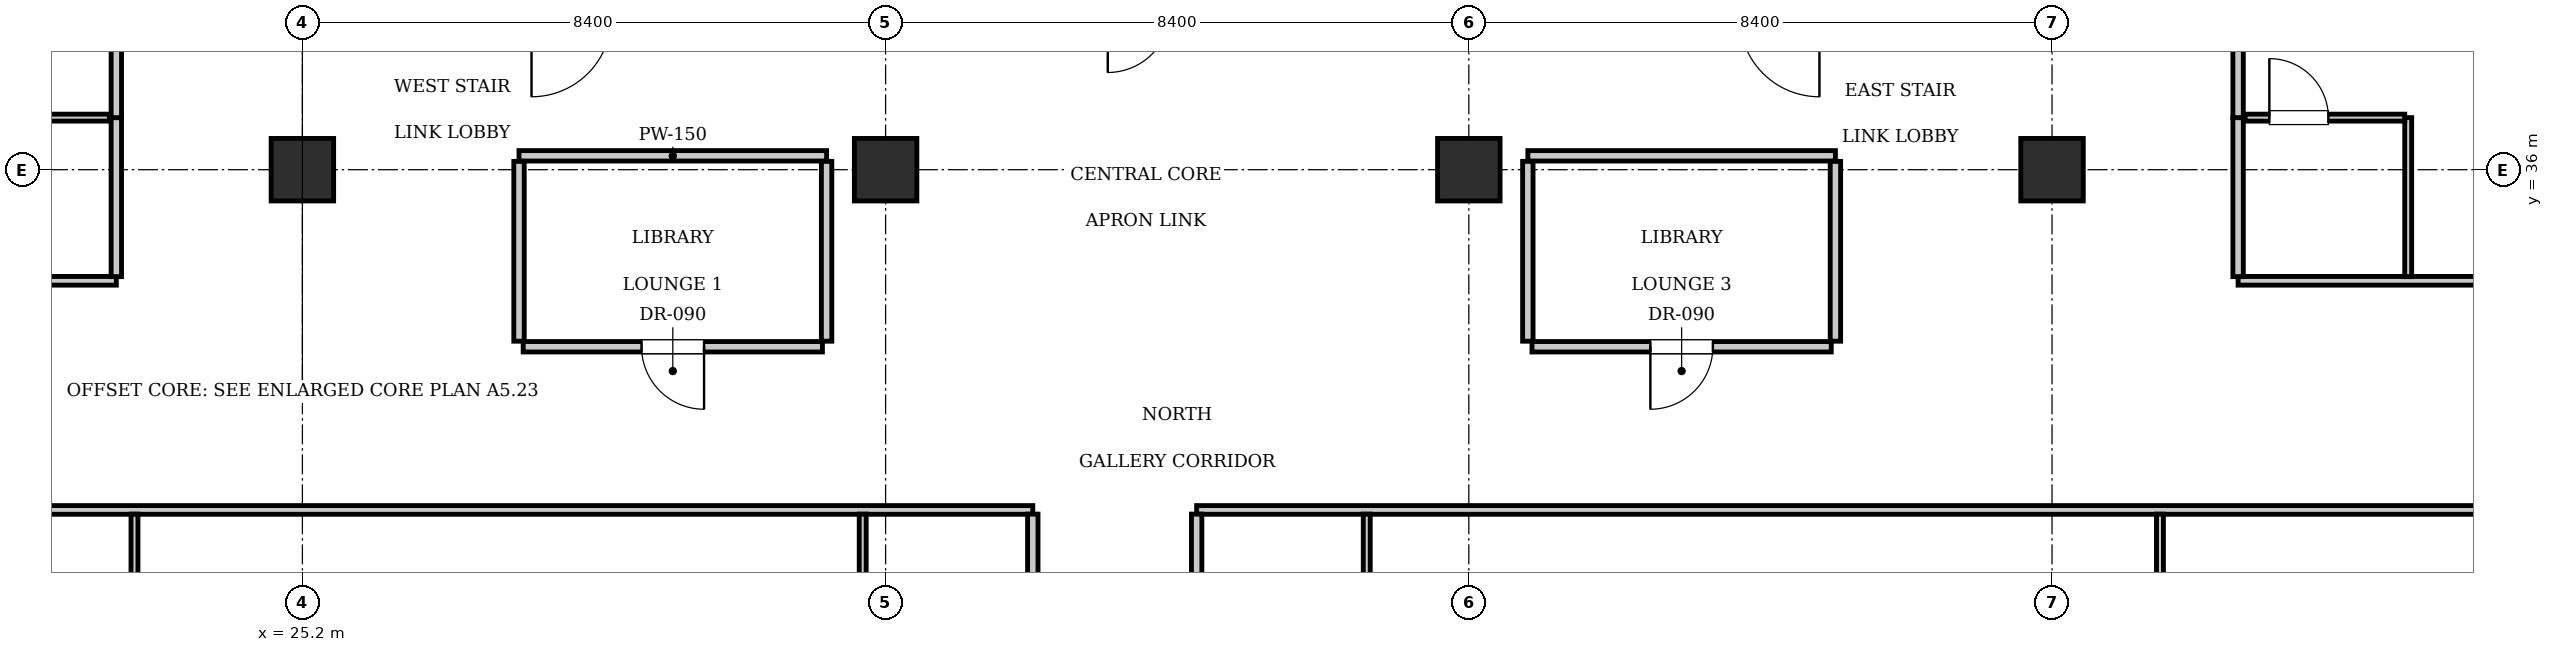
"""IFC4 building model, lengths in metres.
Left out: names, types, materials, properties, quantities, classifications, styles, units other than length and angle.
Written with IfcOpenShell. Run it as: python <this file> out.ifc"""

import sys

from ifc_helpers import new_model, si_unit, direction, frame, frame_2d, origin, origin_2d, place, context, subcontext, project, spatial, rectangle, extrude, element, fill, save


model = new_model("IFC4")
c1 = context("Model", 3, precision=1e-05, world=origin(), true_north=direction((0.0, 1.0)))
c2 = subcontext(c1, "Body", "Model", "MODEL_VIEW")
j1 = project(units=[si_unit("LENGTHUNIT", "METRE"), si_unit("PLANEANGLEUNIT", "RADIAN")], contexts=[c1])
p1 = place(None, origin())
s1 = spatial("IfcSite", under=j1, at=p1, CompositionType="ELEMENT")
p2 = place(p1, origin())
s2 = spatial("IfcBuilding", under=s1, at=p2, CompositionType="ELEMENT")
p3 = place(p2, frame((0.0, 0.0, 185.15)))
s3 = spatial("IfcBuildingStorey", under=s2, at=p3, CompositionType="ELEMENT", Elevation=185.15)
for number, where, z_axis, x_axis in (
    (1, (25.2, 36.0, 0.0), (0.0, 0.0, 1.0), (1.0, 0.0, 0.0)),
    (2, (33.6, 36.0, 0.0), (0.0, 0.0, 1.0), (1.0, 0.0, 0.0)),
    (3, (42.0, 36.0, 0.0), (0.0, 0.0, 1.0), (1.0, 0.0, 0.0)),
    (4, (50.4, 36.0, 0.0), (0.0, 0.0, 1.0), (1.0, 0.0, 0.0)),
):
    element("IfcColumn", number, at=place(p3, frame(where, z_axis=z_axis, x_axis=x_axis)), inside=s3, PredefinedType="COLUMN", context=c2, shape_type="SweptSolid", body=[
        extrude(rectangle(XDim=0.9, YDim=0.9, at=origin_2d()), origin(), (0.0, 0.0, 1.0), 3.85),
    ])
p4 = place(p3, frame((28.32, 36.2, 0.0), z_axis=(0.0, 0.0, 1.0), x_axis=(1.0, 0.0, 0.0)))
e5 = element("IfcWall", 5, at=p4, inside=s3, PredefinedType="PARTITIONING", context=c2, shape_type="SweptSolid", body=[
    extrude(rectangle(XDim=4.43, YDim=0.15, at=frame_2d((2.215, 0.0))), origin(), (0.0, 0.0, 1.0), 3.61),
])
for number, where, z_axis, x_axis in (
    (6, (28.32, 33.53, 0.0), (0.0, 0.0, 1.0), (0.0, 1.0, 0.0)),
    (7, (32.75, 33.53, 0.0), (0.0, 0.0, 1.0), (0.0, 1.0, 0.0)),
):
    element("IfcWall", number, at=place(p3, frame(where, z_axis=z_axis, x_axis=x_axis)), inside=s3, PredefinedType="PARTITIONING", context=c2, shape_type="SweptSolid", body=[
        extrude(rectangle(XDim=2.59, YDim=0.15, at=frame_2d((1.295, 0.0))), origin(), (0.0, 0.0, 1.0), 3.61),
    ])
p5 = place(p3, frame((28.38, 33.45, 0.0), z_axis=(0.0, 0.0, 1.0), x_axis=(1.0, 0.0, 0.0)))
e8 = element("IfcWall", 8, at=p5, inside=s3, PredefinedType="PARTITIONING", context=c2, shape_type="SweptSolid", body=[
    extrude(rectangle(XDim=4.31, YDim=0.15, at=frame_2d((2.155, 0.0))), origin(), (0.0, 0.0, 1.0), 3.61),
])
p6 = place(p5, frame((1.705, 0.0, 0.0)))
e9 = element("IfcOpeningElement", 9, at=p6, cuts=e8, PredefinedType="OPENING", context=c2, shape_type="SweptSolid", body=[
    extrude(rectangle(XDim=0.9, YDim=2.1, at=frame_2d((0.45, 1.05))), frame((0.0, 0.085, 0.0), z_axis=(0.0, -1.0, 0.0), x_axis=(1.0, 0.0, 0.0)), (0.0, 0.0, 1.0), 0.17),
])
p7 = place(p3, frame((42.85, 36.2, 0.0), z_axis=(0.0, 0.0, 1.0), x_axis=(1.0, 0.0, 0.0)))
e10 = element("IfcWall", 10, at=p7, inside=s3, PredefinedType="PARTITIONING", context=c2, shape_type="SweptSolid", body=[
    extrude(rectangle(XDim=4.43, YDim=0.15, at=frame_2d((2.215, 0.0))), origin(), (0.0, 0.0, 1.0), 3.61),
])
for number, where, z_axis, x_axis in (
    (11, (42.85, 33.53, 0.0), (0.0, 0.0, 1.0), (0.0, 1.0, 0.0)),
    (12, (47.28, 33.53, 0.0), (0.0, 0.0, 1.0), (0.0, 1.0, 0.0)),
):
    element("IfcWall", number, at=place(p3, frame(where, z_axis=z_axis, x_axis=x_axis)), inside=s3, PredefinedType="PARTITIONING", context=c2, shape_type="SweptSolid", body=[
        extrude(rectangle(XDim=2.59, YDim=0.15, at=frame_2d((1.295, 0.0))), origin(), (0.0, 0.0, 1.0), 3.61),
    ])
p8 = place(p3, frame((42.91, 33.45, 0.0), z_axis=(0.0, 0.0, 1.0), x_axis=(1.0, 0.0, 0.0)))
e13 = element("IfcWall", 13, at=p8, inside=s3, PredefinedType="PARTITIONING", context=c2, shape_type="SweptSolid", body=[
    extrude(rectangle(XDim=4.31, YDim=0.15, at=frame_2d((2.155, 0.0))), origin(), (0.0, 0.0, 1.0), 3.61),
])
p9 = place(p8, frame((1.705, 0.0, 0.0)))
e14 = element("IfcOpeningElement", 14, at=p9, cuts=e13, PredefinedType="OPENING", context=c2, shape_type="SweptSolid", body=[
    extrude(rectangle(XDim=0.9, YDim=2.1, at=frame_2d((0.45, 1.05))), frame((0.0, 0.085, 0.0), z_axis=(0.0, -1.0, 0.0), x_axis=(1.0, 0.0, 0.0)), (0.0, 0.0, 1.0), 0.17),
])
p10 = place(p3, frame((13.2, 31.1, 0.0), z_axis=(0.0, 0.0, 1.0), x_axis=(1.0, 0.0, 0.0)))
e15 = element("IfcWall", 15, at=p10, inside=s3, PredefinedType="PARTITIONING", context=c2, shape_type="SweptSolid", body=[
    extrude(rectangle(XDim=22.52, YDim=0.125, at=frame_2d((11.26, 0.0))), origin(), (0.0, 0.0, 1.0), 3.61),
])
p11 = place(p3, frame((38.08, 31.1, 0.0), z_axis=(0.0, 0.0, 1.0), x_axis=(1.0, 0.0, 0.0)))
e16 = element("IfcWall", 16, at=p11, inside=s3, PredefinedType="PARTITIONING", context=c2, shape_type="SweptSolid", body=[
    extrude(rectangle(XDim=24.32, YDim=0.125, at=frame_2d((12.16, 0.0))), origin(), (0.0, 0.0, 1.0), 3.61),
])
p12 = place(p3, frame((35.72, 29.15, 0.0), z_axis=(0.0, 0.0, 1.0), x_axis=(0.0, 1.0, 0.0)))
e17 = element("IfcWall", 17, at=p12, inside=s3, PredefinedType="PARTITIONING", context=c2, shape_type="SweptSolid", body=[
    extrude(rectangle(XDim=1.89, YDim=0.15, at=frame_2d((0.945, 0.0))), origin(), (0.0, 0.0, 1.0), 3.61),
])
p13 = place(p3, frame((33.27, 29.15, 0.0), z_axis=(0.0, 0.0, 1.0), x_axis=(0.0, 1.0, 0.0)))
e18 = element("IfcWall", 18, at=p13, inside=s3, PredefinedType="PARTITIONING", context=c2, shape_type="SweptSolid", body=[
    extrude(rectangle(XDim=1.89, YDim=0.1, at=frame_2d((0.945, 0.0))), origin(), (0.0, 0.0, 1.0), 3.61),
])
p14 = place(p3, frame((22.781, 27.46, 0.0), z_axis=(0.0, 0.0, 1.0), x_axis=(0.0, 1.0, 0.0)))
e19 = element("IfcWall", 19, at=p14, inside=s3, PredefinedType="PARTITIONING", context=c2, shape_type="SweptSolid", body=[
    extrude(rectangle(XDim=3.58, YDim=0.1, at=frame_2d((1.79, 0.0))), origin(), (0.0, 0.0, 1.0), 3.61),
])
p15 = place(p14, frame((1.34, 0.0, 0.0)))
e20 = element("IfcOpeningElement", 20, at=p15, cuts=e19, PredefinedType="OPENING", context=c2, shape_type="SweptSolid", body=[
    extrude(rectangle(XDim=0.9, YDim=2.1, at=frame_2d((0.45, 1.05))), frame((0.0, 0.06, 0.0), z_axis=(0.0, -1.0, 0.0), x_axis=(1.0, 0.0, 0.0)), (0.0, 0.0, 1.0), 0.12),
])
p16 = place(p3, frame((38.08, 29.15, 0.0), z_axis=(0.0, 0.0, 1.0), x_axis=(0.0, 1.0, 0.0)))
e21 = element("IfcWall", 21, at=p16, inside=s3, PredefinedType="PARTITIONING", context=c2, shape_type="SweptSolid", body=[
    extrude(rectangle(XDim=1.89, YDim=0.15, at=frame_2d((0.945, 0.0))), origin(), (0.0, 0.0, 1.0), 3.61),
])
p17 = place(p3, frame((40.53, 29.15, 0.0), z_axis=(0.0, 0.0, 1.0), x_axis=(0.0, 1.0, 0.0)))
e22 = element("IfcWall", 22, at=p17, inside=s3, PredefinedType="PARTITIONING", context=c2, shape_type="SweptSolid", body=[
    extrude(rectangle(XDim=1.89, YDim=0.1, at=frame_2d((0.945, 0.0))), origin(), (0.0, 0.0, 1.0), 3.61),
])
p18 = place(p3, frame((51.954, 27.46, 0.0), z_axis=(0.0, 0.0, 1.0), x_axis=(0.0, 1.0, 0.0)))
e23 = element("IfcWall", 23, at=p18, inside=s3, PredefinedType="PARTITIONING", context=c2, shape_type="SweptSolid", body=[
    extrude(rectangle(XDim=3.58, YDim=0.1, at=frame_2d((1.79, 0.0))), origin(), (0.0, 0.0, 1.0), 3.61),
])
p19 = place(p18, frame((1.34, 0.0, 0.0)))
e24 = element("IfcOpeningElement", 24, at=p19, cuts=e23, PredefinedType="OPENING", context=c2, shape_type="SweptSolid", body=[
    extrude(rectangle(XDim=0.9, YDim=2.1, at=frame_2d((0.45, 1.05))), frame((0.0, 0.06, 0.0), z_axis=(0.0, -1.0, 0.0), x_axis=(1.0, 0.0, 0.0)), (0.0, 0.0, 1.0), 0.12),
])
p20 = place(p3, frame((13.2, 34.4, 0.0), z_axis=(0.0, 0.0, 1.0), x_axis=(1.0, 0.0, 0.0)))
e25 = element("IfcWall", 25, at=p20, inside=s3, PredefinedType="PARTITIONING", context=c2, shape_type="SweptSolid", body=[
    extrude(rectangle(XDim=9.32, YDim=0.125, at=frame_2d((4.66, 0.0))), origin(), (0.0, 0.0, 1.0), 3.61),
])
p21 = place(p3, frame((53.08, 34.4, 0.0), z_axis=(0.0, 0.0, 1.0), x_axis=(1.0, 0.0, 0.0)))
e26 = element("IfcWall", 26, at=p21, inside=s3, PredefinedType="PARTITIONING", context=c2, shape_type="SweptSolid", body=[
    extrude(rectangle(XDim=9.32, YDim=0.125, at=frame_2d((4.66, 0.0))), origin(), (0.0, 0.0, 1.0), 3.61),
])
p22 = place(p3, frame((22.52, 34.46, 0.0), z_axis=(0.0, 0.0, 1.0), x_axis=(0.0, 1.0, 0.0)))
e27 = element("IfcWall", 27, at=p22, inside=s3, PredefinedType="PARTITIONING", context=c2, shape_type="SweptSolid", body=[
    extrude(rectangle(XDim=2.29, YDim=0.15, at=frame_2d((1.145, 0.0))), origin(), (0.0, 0.0, 1.0), 3.61),
])
p23 = place(p3, frame((22.52, 36.75, 0.0), z_axis=(0.0, 0.0, 1.0), x_axis=(0.0, 1.0, 0.0)))
e28 = element("IfcWall", 28, at=p23, inside=s3, PredefinedType="PARTITIONING", context=c2, shape_type="SweptSolid", body=[
    extrude(rectangle(XDim=5.159, YDim=0.15, at=frame_2d((2.579, 0.0))), origin(), (0.0, 0.0, 1.0), 3.61),
])
p24 = place(p23, frame((2.104, 0.0, 0.0)))
e29 = element("IfcOpeningElement", 29, at=p24, cuts=e28, PredefinedType="OPENING", context=c2, shape_type="SweptSolid", body=[
    extrude(rectangle(XDim=0.95, YDim=2.15, at=frame_2d((0.475, 1.075))), frame((0.0, 0.085, 0.0), z_axis=(0.0, -1.0, 0.0), x_axis=(1.0, 0.0, 0.0)), (0.0, 0.0, 1.0), 0.17),
])
p25 = place(p3, frame((20.12, 36.75, 0.0), z_axis=(0.0, 0.0, 1.0), x_axis=(1.0, 0.0, 0.0)))
e30 = element("IfcWall", 30, at=p25, inside=s3, PredefinedType="PARTITIONING", context=c2, shape_type="SweptSolid", body=[
    extrude(rectangle(XDim=2.3, YDim=0.1, at=frame_2d((1.15, 0.0))), origin(), (0.0, 0.0, 1.0), 3.61),
])
p26 = place(p25, frame((0.35, 0.0, 0.0)))
e31 = element("IfcOpeningElement", 31, at=p26, cuts=e30, PredefinedType="OPENING", context=c2, shape_type="SweptSolid", body=[
    extrude(rectangle(XDim=0.85, YDim=2.1, at=frame_2d((0.425, 1.05))), frame((0.0, 0.06, 0.0), z_axis=(0.0, -1.0, 0.0), x_axis=(1.0, 0.0, 0.0)), (0.0, 0.0, 1.0), 0.12),
])
p27 = place(p3, frame((53.08, 34.46, 0.0), z_axis=(0.0, 0.0, 1.0), x_axis=(0.0, 1.0, 0.0)))
e32 = element("IfcWall", 32, at=p27, inside=s3, PredefinedType="PARTITIONING", context=c2, shape_type="SweptSolid", body=[
    extrude(rectangle(XDim=2.29, YDim=0.15, at=frame_2d((1.145, 0.0))), origin(), (0.0, 0.0, 1.0), 3.61),
])
p28 = place(p3, frame((53.08, 36.75, 0.0), z_axis=(0.0, 0.0, 1.0), x_axis=(0.0, 1.0, 0.0)))
e33 = element("IfcWall", 33, at=p28, inside=s3, PredefinedType="PARTITIONING", context=c2, shape_type="SweptSolid", body=[
    extrude(rectangle(XDim=5.159, YDim=0.15, at=frame_2d((2.579, 0.0))), origin(), (0.0, 0.0, 1.0), 3.61),
])
p29 = place(p28, frame((2.104, 0.0, 0.0)))
e34 = element("IfcOpeningElement", 34, at=p29, cuts=e33, PredefinedType="OPENING", context=c2, shape_type="SweptSolid", body=[
    extrude(rectangle(XDim=0.95, YDim=2.15, at=frame_2d((0.475, 1.075))), frame((0.0, 0.085, 0.0), z_axis=(0.0, -1.0, 0.0), x_axis=(1.0, 0.0, 0.0)), (0.0, 0.0, 1.0), 0.17),
])
p30 = place(p3, frame((55.53, 34.46, 0.0), z_axis=(0.0, 0.0, 1.0), x_axis=(0.0, 1.0, 0.0)))
e35 = element("IfcWall", 35, at=p30, inside=s3, PredefinedType="PARTITIONING", context=c2, shape_type="SweptSolid", body=[
    extrude(rectangle(XDim=2.29, YDim=0.1, at=frame_2d((1.145, 0.0))), origin(), (0.0, 0.0, 1.0), 3.61),
])
p31 = place(p3, frame((53.18, 36.75, 0.0), z_axis=(0.0, 0.0, 1.0), x_axis=(1.0, 0.0, 0.0)))
e36 = element("IfcWall", 36, at=p31, inside=s3, PredefinedType="PARTITIONING", context=c2, shape_type="SweptSolid", body=[
    extrude(rectangle(XDim=2.3, YDim=0.1, at=frame_2d((1.15, 0.0))), origin(), (0.0, 0.0, 1.0), 3.61),
])
p32 = place(p31, frame((0.35, 0.0, 0.0)))
e37 = element("IfcOpeningElement", 37, at=p32, cuts=e36, PredefinedType="OPENING", context=c2, shape_type="SweptSolid", body=[
    extrude(rectangle(XDim=0.85, YDim=2.1, at=frame_2d((0.425, 1.05))), frame((0.0, 0.06, 0.0), z_axis=(0.0, -1.0, 0.0), x_axis=(1.0, 0.0, 0.0)), (0.0, 0.0, 1.0), 0.12),
])
p33 = place(p6, frame((0.9, 0.0, 0.0), z_axis=(0.0, 0.0, 1.0), x_axis=(-1.0, 0.0, 0.0)))
e38 = element("IfcDoor", 38, at=p33, inside=s3, OperationType="SINGLE_SWING_LEFT", PredefinedType="DOOR", context=c2, shape_type="SweptSolid", body=[
    extrude(rectangle(XDim=0.9, YDim=2.1, at=frame_2d((0.45, 1.05))), frame((0.0, 0.025, 0.0), z_axis=(0.0, -1.0, 0.0), x_axis=(1.0, 0.0, 0.0)), (0.0, 0.0, 1.0), 0.05),
])
fill(e9, e38)
p34 = place(p9, frame((0.9, 0.0, 0.0), z_axis=(0.0, 0.0, 1.0), x_axis=(-1.0, 0.0, 0.0)))
e39 = element("IfcDoor", 39, at=p34, inside=s3, OperationType="SINGLE_SWING_RIGHT", PredefinedType="DOOR", context=c2, shape_type="SweptSolid", body=[
    extrude(rectangle(XDim=0.9, YDim=2.1, at=frame_2d((0.45, 1.05))), frame((0.0, 0.025, 0.0), z_axis=(0.0, -1.0, 0.0), x_axis=(1.0, 0.0, 0.0)), (0.0, 0.0, 1.0), 0.05),
])
fill(e14, e39)
p35 = place(p32, origin())
e40 = element("IfcDoor", 40, at=p35, inside=s3, OperationType="SINGLE_SWING_LEFT", PredefinedType="DOOR", context=c2, shape_type="SweptSolid", body=[
    extrude(rectangle(XDim=0.85, YDim=2.1, at=frame_2d((0.425, 1.05))), frame((0.0, 0.025, 0.0), z_axis=(0.0, -1.0, 0.0), x_axis=(1.0, 0.0, 0.0)), (0.0, 0.0, 1.0), 0.05),
])
fill(e37, e40)
save(model, sys.argv[1])
